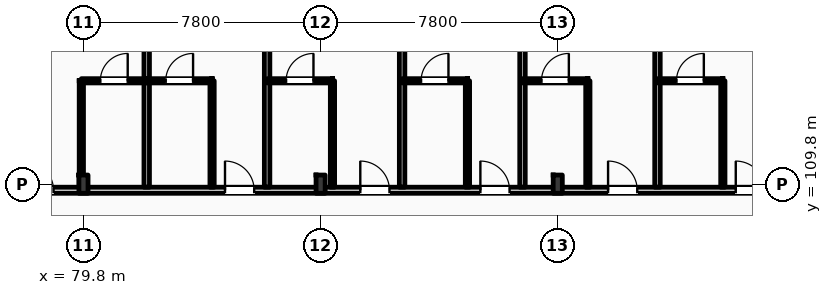
"""IFC4 building model, lengths in metres.
Left out: names, types, materials, properties, quantities, classifications, styles, units other than length and angle.
Written with IfcOpenShell. Run it as: python <this file> out.ifc"""

import sys

from ifc_helpers import new_model, si_unit, direction, frame, frame_2d, origin, origin_2d, place, context, subcontext, project, spatial, rectangle, i_section, extrude, element, fill, save


model = new_model("IFC4")
c1 = context("Model", 3, precision=1e-05, world=origin(), true_north=direction((0.0, 1.0)))
c2 = subcontext(c1, "Body", "Model", "MODEL_VIEW")
j1 = project(units=[si_unit("LENGTHUNIT", "METRE"), si_unit("PLANEANGLEUNIT", "RADIAN")], contexts=[c1])
p1 = place(None, origin())
s1 = spatial("IfcSite", under=j1, at=p1, CompositionType="ELEMENT")
p2 = place(p1, origin())
s2 = spatial("IfcBuilding", under=s1, at=p2, CompositionType="ELEMENT")
p3 = place(p2, frame((0.0, 0.0, 20.4)))
s3 = spatial("IfcBuildingStorey", under=s2, at=p3, CompositionType="ELEMENT", Elevation=20.4)
for number, where, z_axis, x_axis in (
    (1, (79.8, 109.8, 0.0), (0.0, 0.0, 1.0), (1.0, 0.0, 0.0)),
    (2, (87.6, 109.8, 0.0), (0.0, 0.0, 1.0), (1.0, 0.0, 0.0)),
    (3, (95.4, 109.8, 0.0), (0.0, 0.0, 1.0), (1.0, 0.0, 0.0)),
):
    element("IfcColumn", number, at=place(p3, frame(where, z_axis=z_axis, x_axis=x_axis)), inside=s3, PredefinedType="COLUMN", context=c2, shape_type="SweptSolid", body=[
        extrude(i_section(OverallWidth=0.3, OverallDepth=0.6, WebThickness=0.015, FlangeThickness=0.03, FilletRadius=0.027, at=origin_2d()), origin(), (0.0, 0.0, 1.0), 4.2),
    ])
p4 = place(p3, frame((10.65, 109.6, 0.0), z_axis=(0.0, 0.0, 1.0), x_axis=(1.0, 0.0, 0.0)))
e4 = element("IfcWall", 4, at=p4, inside=s3, PredefinedType="PARTITIONING", context=c2, shape_type="SweptSolid", body=[
    extrude(rectangle(XDim=109.21, YDim=0.2, at=frame_2d((54.605, 0.0))), origin(), (0.0, 0.0, 1.0), 3.38),
])
p5 = place(p4, frame((12.535, 0.0, 0.0)))
e5 = element("IfcOpeningElement", 5, at=p5, cuts=e4, PredefinedType="OPENING", context=c2, shape_type="SweptSolid", body=[
    extrude(rectangle(XDim=1.02, YDim=2.2, at=frame_2d((0.51, 1.1))), frame((0.0, 0.11, 0.0), z_axis=(0.0, -1.0, 0.0), x_axis=(1.0, 0.0, 0.0)), (0.0, 0.0, 1.0), 0.22),
])
p6 = place(p4, frame((19.175, 0.0, 0.0)))
e6 = element("IfcOpeningElement", 6, at=p6, cuts=e4, PredefinedType="OPENING", context=c2, shape_type="SweptSolid", body=[
    extrude(rectangle(XDim=1.02, YDim=2.2, at=frame_2d((0.51, 1.1))), frame((0.0, 0.11, 0.0), z_axis=(0.0, -1.0, 0.0), x_axis=(1.0, 0.0, 0.0)), (0.0, 0.0, 1.0), 0.22),
])
p7 = place(p4, frame((23.375, 0.0, 0.0)))
e7 = element("IfcOpeningElement", 7, at=p7, cuts=e4, PredefinedType="OPENING", context=c2, shape_type="SweptSolid", body=[
    extrude(rectangle(XDim=1.02, YDim=2.2, at=frame_2d((0.51, 1.1))), frame((0.0, 0.11, 0.0), z_axis=(0.0, -1.0, 0.0), x_axis=(1.0, 0.0, 0.0)), (0.0, 0.0, 1.0), 0.22),
])
p8 = place(p4, frame((27.575, 0.0, 0.0)))
e8 = element("IfcOpeningElement", 8, at=p8, cuts=e4, PredefinedType="OPENING", context=c2, shape_type="SweptSolid", body=[
    extrude(rectangle(XDim=1.02, YDim=2.2, at=frame_2d((0.51, 1.1))), frame((0.0, 0.11, 0.0), z_axis=(0.0, -1.0, 0.0), x_axis=(1.0, 0.0, 0.0)), (0.0, 0.0, 1.0), 0.22),
])
p9 = place(p4, frame((31.805, 0.0, 0.0)))
e9 = element("IfcOpeningElement", 9, at=p9, cuts=e4, PredefinedType="OPENING", context=c2, shape_type="SweptSolid", body=[
    extrude(rectangle(XDim=0.96, YDim=2.2, at=frame_2d((0.48, 1.1))), frame((0.0, 0.11, 0.0), z_axis=(0.0, -1.0, 0.0), x_axis=(1.0, 0.0, 0.0)), (0.0, 0.0, 1.0), 0.22),
])
p10 = place(p4, frame((33.855, 0.0, 0.0)))
e10 = element("IfcOpeningElement", 10, at=p10, cuts=e4, PredefinedType="OPENING", context=c2, shape_type="SweptSolid", body=[
    extrude(rectangle(XDim=0.96, YDim=2.2, at=frame_2d((0.48, 1.1))), frame((0.0, 0.11, 0.0), z_axis=(0.0, -1.0, 0.0), x_axis=(1.0, 0.0, 0.0)), (0.0, 0.0, 1.0), 0.22),
])
p11 = place(p4, frame((40.205, 0.0, 0.0)))
e11 = element("IfcOpeningElement", 11, at=p11, cuts=e4, PredefinedType="OPENING", context=c2, shape_type="SweptSolid", body=[
    extrude(rectangle(XDim=0.96, YDim=2.2, at=frame_2d((0.48, 1.1))), frame((0.0, 0.11, 0.0), z_axis=(0.0, -1.0, 0.0), x_axis=(1.0, 0.0, 0.0)), (0.0, 0.0, 1.0), 0.22),
])
p12 = place(p4, frame((42.255, 0.0, 0.0)))
e12 = element("IfcOpeningElement", 12, at=p12, cuts=e4, PredefinedType="OPENING", context=c2, shape_type="SweptSolid", body=[
    extrude(rectangle(XDim=0.96, YDim=2.2, at=frame_2d((0.48, 1.1))), frame((0.0, 0.11, 0.0), z_axis=(0.0, -1.0, 0.0), x_axis=(1.0, 0.0, 0.0)), (0.0, 0.0, 1.0), 0.22),
])
p13 = place(p4, frame((48.605, 0.0, 0.0)))
e13 = element("IfcOpeningElement", 13, at=p13, cuts=e4, PredefinedType="OPENING", context=c2, shape_type="SweptSolid", body=[
    extrude(rectangle(XDim=0.96, YDim=2.2, at=frame_2d((0.48, 1.1))), frame((0.0, 0.11, 0.0), z_axis=(0.0, -1.0, 0.0), x_axis=(1.0, 0.0, 0.0)), (0.0, 0.0, 1.0), 0.22),
])
p14 = place(p4, frame((50.655, 0.0, 0.0)))
e14 = element("IfcOpeningElement", 14, at=p14, cuts=e4, PredefinedType="OPENING", context=c2, shape_type="SweptSolid", body=[
    extrude(rectangle(XDim=0.96, YDim=2.2, at=frame_2d((0.48, 1.1))), frame((0.0, 0.11, 0.0), z_axis=(0.0, -1.0, 0.0), x_axis=(1.0, 0.0, 0.0)), (0.0, 0.0, 1.0), 0.22),
])
p15 = place(p4, frame((57.005, 0.0, 0.0)))
e15 = element("IfcOpeningElement", 15, at=p15, cuts=e4, PredefinedType="OPENING", context=c2, shape_type="SweptSolid", body=[
    extrude(rectangle(XDim=0.96, YDim=2.2, at=frame_2d((0.48, 1.1))), frame((0.0, 0.11, 0.0), z_axis=(0.0, -1.0, 0.0), x_axis=(1.0, 0.0, 0.0)), (0.0, 0.0, 1.0), 0.22),
])
p16 = place(p4, frame((59.055, 0.0, 0.0)))
e16 = element("IfcOpeningElement", 16, at=p16, cuts=e4, PredefinedType="OPENING", context=c2, shape_type="SweptSolid", body=[
    extrude(rectangle(XDim=0.96, YDim=2.2, at=frame_2d((0.48, 1.1))), frame((0.0, 0.11, 0.0), z_axis=(0.0, -1.0, 0.0), x_axis=(1.0, 0.0, 0.0)), (0.0, 0.0, 1.0), 0.22),
])
p17 = place(p4, frame((65.405, 0.0, 0.0)))
e17 = element("IfcOpeningElement", 17, at=p17, cuts=e4, PredefinedType="OPENING", context=c2, shape_type="SweptSolid", body=[
    extrude(rectangle(XDim=0.96, YDim=2.2, at=frame_2d((0.48, 1.1))), frame((0.0, 0.11, 0.0), z_axis=(0.0, -1.0, 0.0), x_axis=(1.0, 0.0, 0.0)), (0.0, 0.0, 1.0), 0.22),
])
p18 = place(p4, frame((67.205, 0.0, 0.0)))
e18 = element("IfcOpeningElement", 18, at=p18, cuts=e4, PredefinedType="OPENING", context=c2, shape_type="SweptSolid", body=[
    extrude(rectangle(XDim=0.96, YDim=2.2, at=frame_2d((0.48, 1.1))), frame((0.0, 0.11, 0.0), z_axis=(0.0, -1.0, 0.0), x_axis=(1.0, 0.0, 0.0)), (0.0, 0.0, 1.0), 0.22),
])
p19 = place(p4, frame((73.805, 0.0, 0.0)))
e19 = element("IfcOpeningElement", 19, at=p19, cuts=e4, PredefinedType="OPENING", context=c2, shape_type="SweptSolid", body=[
    extrude(rectangle(XDim=0.96, YDim=2.2, at=frame_2d((0.48, 1.1))), frame((0.0, 0.11, 0.0), z_axis=(0.0, -1.0, 0.0), x_axis=(1.0, 0.0, 0.0)), (0.0, 0.0, 1.0), 0.22),
])
p20 = place(p4, frame((78.255, 0.0, 0.0)))
e20 = element("IfcOpeningElement", 20, at=p20, cuts=e4, PredefinedType="OPENING", context=c2, shape_type="SweptSolid", body=[
    extrude(rectangle(XDim=0.96, YDim=2.2, at=frame_2d((0.48, 1.1))), frame((0.0, 0.11, 0.0), z_axis=(0.0, -1.0, 0.0), x_axis=(1.0, 0.0, 0.0)), (0.0, 0.0, 1.0), 0.22),
])
p21 = place(p4, frame((82.205, 0.0, 0.0)))
e21 = element("IfcOpeningElement", 21, at=p21, cuts=e4, PredefinedType="OPENING", context=c2, shape_type="SweptSolid", body=[
    extrude(rectangle(XDim=0.96, YDim=2.2, at=frame_2d((0.48, 1.1))), frame((0.0, 0.11, 0.0), z_axis=(0.0, -1.0, 0.0), x_axis=(1.0, 0.0, 0.0)), (0.0, 0.0, 1.0), 0.22),
])
p22 = place(p4, frame((86.405, 0.0, 0.0)))
e22 = element("IfcOpeningElement", 22, at=p22, cuts=e4, PredefinedType="OPENING", context=c2, shape_type="SweptSolid", body=[
    extrude(rectangle(XDim=0.96, YDim=2.2, at=frame_2d((0.48, 1.1))), frame((0.0, 0.11, 0.0), z_axis=(0.0, -1.0, 0.0), x_axis=(1.0, 0.0, 0.0)), (0.0, 0.0, 1.0), 0.22),
])
p23 = place(p4, frame((90.605, 0.0, 0.0)))
e23 = element("IfcOpeningElement", 23, at=p23, cuts=e4, PredefinedType="OPENING", context=c2, shape_type="SweptSolid", body=[
    extrude(rectangle(XDim=0.96, YDim=2.2, at=frame_2d((0.48, 1.1))), frame((0.0, 0.11, 0.0), z_axis=(0.0, -1.0, 0.0), x_axis=(1.0, 0.0, 0.0)), (0.0, 0.0, 1.0), 0.22),
])
p24 = place(p4, frame((94.805, 0.0, 0.0)))
e24 = element("IfcOpeningElement", 24, at=p24, cuts=e4, PredefinedType="OPENING", context=c2, shape_type="SweptSolid", body=[
    extrude(rectangle(XDim=0.96, YDim=2.2, at=frame_2d((0.48, 1.1))), frame((0.0, 0.11, 0.0), z_axis=(0.0, -1.0, 0.0), x_axis=(1.0, 0.0, 0.0)), (0.0, 0.0, 1.0), 0.22),
])
p25 = place(p4, frame((99.005, 0.0, 0.0)))
e25 = element("IfcOpeningElement", 25, at=p25, cuts=e4, PredefinedType="OPENING", context=c2, shape_type="SweptSolid", body=[
    extrude(rectangle(XDim=0.96, YDim=2.2, at=frame_2d((0.48, 1.1))), frame((0.0, 0.11, 0.0), z_axis=(0.0, -1.0, 0.0), x_axis=(1.0, 0.0, 0.0)), (0.0, 0.0, 1.0), 0.22),
])
p26 = place(p4, frame((103.205, 0.0, 0.0)))
e26 = element("IfcOpeningElement", 26, at=p26, cuts=e4, PredefinedType="OPENING", context=c2, shape_type="SweptSolid", body=[
    extrude(rectangle(XDim=0.96, YDim=2.2, at=frame_2d((0.48, 1.1))), frame((0.0, 0.11, 0.0), z_axis=(0.0, -1.0, 0.0), x_axis=(1.0, 0.0, 0.0)), (0.0, 0.0, 1.0), 0.22),
])
p27 = place(p4, frame((105.335, 0.0, 0.0)))
e27 = element("IfcOpeningElement", 27, at=p27, cuts=e4, PredefinedType="OPENING", context=c2, shape_type="SweptSolid", body=[
    extrude(rectangle(XDim=0.96, YDim=2.2, at=frame_2d((0.48, 1.1))), frame((0.0, 0.11, 0.0), z_axis=(0.0, -1.0, 0.0), x_axis=(1.0, 0.0, 0.0)), (0.0, 0.0, 1.0), 0.22),
])
p28 = place(p4, frame((2.716, 0.0, 0.0)))
e28 = element("IfcOpeningElement", 28, at=p28, cuts=e4, PredefinedType="OPENING", context=c2, shape_type="SweptSolid", body=[
    extrude(rectangle(XDim=1.35, YDim=2.25, at=frame_2d((0.675, 1.125))), frame((0.0, 0.11, 0.0), z_axis=(0.0, -1.0, 0.0), x_axis=(1.0, 0.0, 0.0)), (0.0, 0.0, 1.0), 0.22),
])
p29 = place(p4, frame((6.65, 0.0, 0.0)))
e29 = element("IfcOpeningElement", 29, at=p29, cuts=e4, PredefinedType="OPENING", context=c2, shape_type="SweptSolid", body=[
    extrude(rectangle(XDim=1.35, YDim=2.25, at=frame_2d((0.675, 1.125))), frame((0.0, 0.11, 0.0), z_axis=(0.0, -1.0, 0.0), x_axis=(1.0, 0.0, 0.0)), (0.0, 0.0, 1.0), 0.22),
])
p30 = place(p4, frame((10.583, 0.0, 0.0)))
e30 = element("IfcOpeningElement", 30, at=p30, cuts=e4, PredefinedType="OPENING", context=c2, shape_type="SweptSolid", body=[
    extrude(rectangle(XDim=1.35, YDim=2.25, at=frame_2d((0.675, 1.125))), frame((0.0, 0.11, 0.0), z_axis=(0.0, -1.0, 0.0), x_axis=(1.0, 0.0, 0.0)), (0.0, 0.0, 1.0), 0.22),
])
p31 = place(p3, frame((81.88, 109.7, 0.0), z_axis=(0.0, 0.0, 1.0), x_axis=(0.0, 1.0, 0.0)))
e31 = element("IfcWall", 31, at=p31, inside=s3, PredefinedType="PARTITIONING", context=c2, shape_type="SweptSolid", body=[
    extrude(rectangle(XDim=8.15, YDim=0.18, at=frame_2d((4.075, 0.0))), origin(), (0.0, 0.0, 1.0), 3.94),
])
p32 = place(p3, frame((79.73, 109.7, 0.0), z_axis=(0.0, 0.0, 1.0), x_axis=(0.0, 1.0, 0.0)))
e32 = element("IfcWall", 32, at=p32, inside=s3, PredefinedType="PARTITIONING", context=c2, shape_type="SweptSolid", body=[
    extrude(rectangle(XDim=3.5, YDim=0.14, at=frame_2d((1.75, 0.0))), origin(), (0.0, 0.0, 1.0), 3.53),
])
p33 = place(p3, frame((79.73, 113.2, 0.0), z_axis=(0.0, 0.0, 1.0), x_axis=(1.0, 0.0, 0.0)))
e33 = element("IfcWall", 33, at=p33, inside=s3, PredefinedType="PARTITIONING", context=c2, shape_type="SweptSolid", body=[
    extrude(rectangle(XDim=2.15, YDim=0.14, at=frame_2d((1.075, 0.0))), origin(), (0.0, 0.0, 1.0), 3.94),
])
p34 = place(p33, frame((0.625, 0.0, 0.0)))
e34 = element("IfcOpeningElement", 34, at=p34, cuts=e33, PredefinedType="OPENING", context=c2, shape_type="SweptSolid", body=[
    extrude(rectangle(XDim=0.9, YDim=2.1, at=frame_2d((0.45, 1.05))), frame((0.0, 0.08, 0.0), z_axis=(0.0, -1.0, 0.0), x_axis=(1.0, 0.0, 0.0)), (0.0, 0.0, 1.0), 0.16),
])
p35 = place(p3, frame((85.84, 109.7, 0.0), z_axis=(0.0, 0.0, 1.0), x_axis=(0.0, 1.0, 0.0)))
e35 = element("IfcWall", 35, at=p35, inside=s3, PredefinedType="PARTITIONING", context=c2, shape_type="SweptSolid", body=[
    extrude(rectangle(XDim=8.15, YDim=0.18, at=frame_2d((4.075, 0.0))), origin(), (0.0, 0.0, 1.0), 3.94),
])
p36 = place(p3, frame((84.03, 109.7, 0.0), z_axis=(0.0, 0.0, 1.0), x_axis=(0.0, 1.0, 0.0)))
e36 = element("IfcWall", 36, at=p36, inside=s3, PredefinedType="PARTITIONING", context=c2, shape_type="SweptSolid", body=[
    extrude(rectangle(XDim=3.5, YDim=0.14, at=frame_2d((1.75, 0.0))), origin(), (0.0, 0.0, 1.0), 3.94),
])
p37 = place(p3, frame((81.88, 113.2, 0.0), z_axis=(0.0, 0.0, 1.0), x_axis=(1.0, 0.0, 0.0)))
e37 = element("IfcWall", 37, at=p37, inside=s3, PredefinedType="PARTITIONING", context=c2, shape_type="SweptSolid", body=[
    extrude(rectangle(XDim=2.15, YDim=0.14, at=frame_2d((1.075, 0.0))), origin(), (0.0, 0.0, 1.0), 3.94),
])
p38 = place(p37, frame((0.625, 0.0, 0.0)))
e38 = element("IfcOpeningElement", 38, at=p38, cuts=e37, PredefinedType="OPENING", context=c2, shape_type="SweptSolid", body=[
    extrude(rectangle(XDim=0.9, YDim=2.1, at=frame_2d((0.45, 1.05))), frame((0.0, 0.08, 0.0), z_axis=(0.0, -1.0, 0.0), x_axis=(1.0, 0.0, 0.0)), (0.0, 0.0, 1.0), 0.16),
])
p39 = place(p3, frame((90.28, 109.7, 0.0), z_axis=(0.0, 0.0, 1.0), x_axis=(0.0, 1.0, 0.0)))
e39 = element("IfcWall", 39, at=p39, inside=s3, PredefinedType="PARTITIONING", context=c2, shape_type="SweptSolid", body=[
    extrude(rectangle(XDim=8.15, YDim=0.18, at=frame_2d((4.075, 0.0))), origin(), (0.0, 0.0, 1.0), 3.63),
])
p40 = place(p3, frame((87.99, 109.7, 0.0), z_axis=(0.0, 0.0, 1.0), x_axis=(0.0, 1.0, 0.0)))
e40 = element("IfcWall", 40, at=p40, inside=s3, PredefinedType="PARTITIONING", context=c2, shape_type="SweptSolid", body=[
    extrude(rectangle(XDim=3.5, YDim=0.14, at=frame_2d((1.75, 0.0))), origin(), (0.0, 0.0, 1.0), 3.94),
])
p41 = place(p3, frame((85.84, 113.2, 0.0), z_axis=(0.0, 0.0, 1.0), x_axis=(1.0, 0.0, 0.0)))
e41 = element("IfcWall", 41, at=p41, inside=s3, PredefinedType="PARTITIONING", context=c2, shape_type="SweptSolid", body=[
    extrude(rectangle(XDim=2.15, YDim=0.14, at=frame_2d((1.075, 0.0))), origin(), (0.0, 0.0, 1.0), 3.94),
])
p42 = place(p41, frame((0.625, 0.0, 0.0)))
e42 = element("IfcOpeningElement", 42, at=p42, cuts=e41, PredefinedType="OPENING", context=c2, shape_type="SweptSolid", body=[
    extrude(rectangle(XDim=0.9, YDim=2.1, at=frame_2d((0.45, 1.05))), frame((0.0, 0.08, 0.0), z_axis=(0.0, -1.0, 0.0), x_axis=(1.0, 0.0, 0.0)), (0.0, 0.0, 1.0), 0.16),
])
p43 = place(p3, frame((94.24, 109.7, 0.0), z_axis=(0.0, 0.0, 1.0), x_axis=(0.0, 1.0, 0.0)))
e43 = element("IfcWall", 43, at=p43, inside=s3, PredefinedType="PARTITIONING", context=c2, shape_type="SweptSolid", body=[
    extrude(rectangle(XDim=8.15, YDim=0.18, at=frame_2d((4.075, 0.0))), origin(), (0.0, 0.0, 1.0), 3.94),
])
p44 = place(p3, frame((92.43, 109.7, 0.0), z_axis=(0.0, 0.0, 1.0), x_axis=(0.0, 1.0, 0.0)))
e44 = element("IfcWall", 44, at=p44, inside=s3, PredefinedType="PARTITIONING", context=c2, shape_type="SweptSolid", body=[
    extrude(rectangle(XDim=3.5, YDim=0.14, at=frame_2d((1.75, 0.0))), origin(), (0.0, 0.0, 1.0), 3.94),
])
p45 = place(p3, frame((90.28, 113.2, 0.0), z_axis=(0.0, 0.0, 1.0), x_axis=(1.0, 0.0, 0.0)))
e45 = element("IfcWall", 45, at=p45, inside=s3, PredefinedType="PARTITIONING", context=c2, shape_type="SweptSolid", body=[
    extrude(rectangle(XDim=2.15, YDim=0.14, at=frame_2d((1.075, 0.0))), origin(), (0.0, 0.0, 1.0), 3.94),
])
p46 = place(p45, frame((0.625, 0.0, 0.0)))
e46 = element("IfcOpeningElement", 46, at=p46, cuts=e45, PredefinedType="OPENING", context=c2, shape_type="SweptSolid", body=[
    extrude(rectangle(XDim=0.9, YDim=2.1, at=frame_2d((0.45, 1.05))), frame((0.0, 0.08, 0.0), z_axis=(0.0, -1.0, 0.0), x_axis=(1.0, 0.0, 0.0)), (0.0, 0.0, 1.0), 0.16),
])
p47 = place(p3, frame((98.68, 109.7, 0.0), z_axis=(0.0, 0.0, 1.0), x_axis=(0.0, 1.0, 0.0)))
e47 = element("IfcWall", 47, at=p47, inside=s3, PredefinedType="PARTITIONING", context=c2, shape_type="SweptSolid", body=[
    extrude(rectangle(XDim=8.15, YDim=0.18, at=frame_2d((4.075, 0.0))), origin(), (0.0, 0.0, 1.0), 3.94),
])
p48 = place(p3, frame((96.39, 109.7, 0.0), z_axis=(0.0, 0.0, 1.0), x_axis=(0.0, 1.0, 0.0)))
e48 = element("IfcWall", 48, at=p48, inside=s3, PredefinedType="PARTITIONING", context=c2, shape_type="SweptSolid", body=[
    extrude(rectangle(XDim=3.5, YDim=0.14, at=frame_2d((1.75, 0.0))), origin(), (0.0, 0.0, 1.0), 3.94),
])
p49 = place(p3, frame((94.24, 113.2, 0.0), z_axis=(0.0, 0.0, 1.0), x_axis=(1.0, 0.0, 0.0)))
e49 = element("IfcWall", 49, at=p49, inside=s3, PredefinedType="PARTITIONING", context=c2, shape_type="SweptSolid", body=[
    extrude(rectangle(XDim=2.15, YDim=0.14, at=frame_2d((1.075, 0.0))), origin(), (0.0, 0.0, 1.0), 3.94),
])
p50 = place(p49, frame((0.625, 0.0, 0.0)))
e50 = element("IfcOpeningElement", 50, at=p50, cuts=e49, PredefinedType="OPENING", context=c2, shape_type="SweptSolid", body=[
    extrude(rectangle(XDim=0.9, YDim=2.1, at=frame_2d((0.45, 1.05))), frame((0.0, 0.08, 0.0), z_axis=(0.0, -1.0, 0.0), x_axis=(1.0, 0.0, 0.0)), (0.0, 0.0, 1.0), 0.16),
])
p51 = place(p3, frame((100.83, 109.7, 0.0), z_axis=(0.0, 0.0, 1.0), x_axis=(0.0, 1.0, 0.0)))
e51 = element("IfcWall", 51, at=p51, inside=s3, PredefinedType="PARTITIONING", context=c2, shape_type="SweptSolid", body=[
    extrude(rectangle(XDim=3.5, YDim=0.14, at=frame_2d((1.75, 0.0))), origin(), (0.0, 0.0, 1.0), 3.94),
])
p52 = place(p3, frame((98.68, 113.2, 0.0), z_axis=(0.0, 0.0, 1.0), x_axis=(1.0, 0.0, 0.0)))
e52 = element("IfcWall", 52, at=p52, inside=s3, PredefinedType="PARTITIONING", context=c2, shape_type="SweptSolid", body=[
    extrude(rectangle(XDim=2.15, YDim=0.14, at=frame_2d((1.075, 0.0))), origin(), (0.0, 0.0, 1.0), 3.94),
])
p53 = place(p52, frame((0.625, 0.0, 0.0)))
e53 = element("IfcOpeningElement", 53, at=p53, cuts=e52, PredefinedType="OPENING", context=c2, shape_type="SweptSolid", body=[
    extrude(rectangle(XDim=0.9, YDim=2.1, at=frame_2d((0.45, 1.05))), frame((0.0, 0.08, 0.0), z_axis=(0.0, -1.0, 0.0), x_axis=(1.0, 0.0, 0.0)), (0.0, 0.0, 1.0), 0.16),
])
p54 = place(p18, origin())
e54 = element("IfcDoor", 54, at=p54, inside=s3, OperationType="SINGLE_SWING_LEFT", PredefinedType="DOOR", context=c2, shape_type="SweptSolid", body=[
    extrude(rectangle(XDim=0.96, YDim=2.2, at=frame_2d((0.48, 1.1))), frame((0.0, 0.025, 0.0), z_axis=(0.0, -1.0, 0.0), x_axis=(1.0, 0.0, 0.0)), (0.0, 0.0, 1.0), 0.05),
])
fill(e18, e54)
p55 = place(p34, origin())
e55 = element("IfcDoor", 55, at=p55, inside=s3, OperationType="SINGLE_SWING_RIGHT", PredefinedType="DOOR", context=c2, shape_type="SweptSolid", body=[
    extrude(rectangle(XDim=0.9, YDim=2.1, at=frame_2d((0.45, 1.05))), frame((0.0, 0.025, 0.0), z_axis=(0.0, -1.0, 0.0), x_axis=(1.0, 0.0, 0.0)), (0.0, 0.0, 1.0), 0.05),
])
fill(e34, e55)
p56 = place(p19, origin())
e56 = element("IfcDoor", 56, at=p56, inside=s3, OperationType="SINGLE_SWING_LEFT", PredefinedType="DOOR", context=c2, shape_type="SweptSolid", body=[
    extrude(rectangle(XDim=0.96, YDim=2.2, at=frame_2d((0.48, 1.1))), frame((0.0, 0.025, 0.0), z_axis=(0.0, -1.0, 0.0), x_axis=(1.0, 0.0, 0.0)), (0.0, 0.0, 1.0), 0.05),
])
fill(e19, e56)
p57 = place(p38, origin())
e57 = element("IfcDoor", 57, at=p57, inside=s3, OperationType="SINGLE_SWING_RIGHT", PredefinedType="DOOR", context=c2, shape_type="SweptSolid", body=[
    extrude(rectangle(XDim=0.9, YDim=2.1, at=frame_2d((0.45, 1.05))), frame((0.0, 0.025, 0.0), z_axis=(0.0, -1.0, 0.0), x_axis=(1.0, 0.0, 0.0)), (0.0, 0.0, 1.0), 0.05),
])
fill(e38, e57)
p58 = place(p20, origin())
e58 = element("IfcDoor", 58, at=p58, inside=s3, OperationType="SINGLE_SWING_LEFT", PredefinedType="DOOR", context=c2, shape_type="SweptSolid", body=[
    extrude(rectangle(XDim=0.96, YDim=2.2, at=frame_2d((0.48, 1.1))), frame((0.0, 0.025, 0.0), z_axis=(0.0, -1.0, 0.0), x_axis=(1.0, 0.0, 0.0)), (0.0, 0.0, 1.0), 0.05),
])
fill(e20, e58)
p59 = place(p42, origin())
e59 = element("IfcDoor", 59, at=p59, inside=s3, OperationType="SINGLE_SWING_RIGHT", PredefinedType="DOOR", context=c2, shape_type="SweptSolid", body=[
    extrude(rectangle(XDim=0.9, YDim=2.1, at=frame_2d((0.45, 1.05))), frame((0.0, 0.025, 0.0), z_axis=(0.0, -1.0, 0.0), x_axis=(1.0, 0.0, 0.0)), (0.0, 0.0, 1.0), 0.05),
])
fill(e42, e59)
p60 = place(p21, origin())
e60 = element("IfcDoor", 60, at=p60, inside=s3, OperationType="SINGLE_SWING_LEFT", PredefinedType="DOOR", context=c2, shape_type="SweptSolid", body=[
    extrude(rectangle(XDim=0.96, YDim=2.2, at=frame_2d((0.48, 1.1))), frame((0.0, 0.025, 0.0), z_axis=(0.0, -1.0, 0.0), x_axis=(1.0, 0.0, 0.0)), (0.0, 0.0, 1.0), 0.05),
])
fill(e21, e60)
p61 = place(p46, origin())
e61 = element("IfcDoor", 61, at=p61, inside=s3, OperationType="SINGLE_SWING_RIGHT", PredefinedType="DOOR", context=c2, shape_type="SweptSolid", body=[
    extrude(rectangle(XDim=0.9, YDim=2.1, at=frame_2d((0.45, 1.05))), frame((0.0, 0.025, 0.0), z_axis=(0.0, -1.0, 0.0), x_axis=(1.0, 0.0, 0.0)), (0.0, 0.0, 1.0), 0.05),
])
fill(e46, e61)
p62 = place(p22, origin())
e62 = element("IfcDoor", 62, at=p62, inside=s3, OperationType="SINGLE_SWING_LEFT", PredefinedType="DOOR", context=c2, shape_type="SweptSolid", body=[
    extrude(rectangle(XDim=0.96, YDim=2.2, at=frame_2d((0.48, 1.1))), frame((0.0, 0.025, 0.0), z_axis=(0.0, -1.0, 0.0), x_axis=(1.0, 0.0, 0.0)), (0.0, 0.0, 1.0), 0.05),
])
fill(e22, e62)
p63 = place(p50, origin())
e63 = element("IfcDoor", 63, at=p63, inside=s3, OperationType="SINGLE_SWING_RIGHT", PredefinedType="DOOR", context=c2, shape_type="SweptSolid", body=[
    extrude(rectangle(XDim=0.9, YDim=2.1, at=frame_2d((0.45, 1.05))), frame((0.0, 0.025, 0.0), z_axis=(0.0, -1.0, 0.0), x_axis=(1.0, 0.0, 0.0)), (0.0, 0.0, 1.0), 0.05),
])
fill(e50, e63)
p64 = place(p23, origin())
e64 = element("IfcDoor", 64, at=p64, inside=s3, OperationType="SINGLE_SWING_LEFT", PredefinedType="DOOR", context=c2, shape_type="SweptSolid", body=[
    extrude(rectangle(XDim=0.96, YDim=2.2, at=frame_2d((0.48, 1.1))), frame((0.0, 0.025, 0.0), z_axis=(0.0, -1.0, 0.0), x_axis=(1.0, 0.0, 0.0)), (0.0, 0.0, 1.0), 0.05),
])
fill(e23, e64)
p65 = place(p53, origin())
e65 = element("IfcDoor", 65, at=p65, inside=s3, OperationType="SINGLE_SWING_RIGHT", PredefinedType="DOOR", context=c2, shape_type="SweptSolid", body=[
    extrude(rectangle(XDim=0.9, YDim=2.1, at=frame_2d((0.45, 1.05))), frame((0.0, 0.025, 0.0), z_axis=(0.0, -1.0, 0.0), x_axis=(1.0, 0.0, 0.0)), (0.0, 0.0, 1.0), 0.05),
])
fill(e53, e65)
save(model, sys.argv[1])
